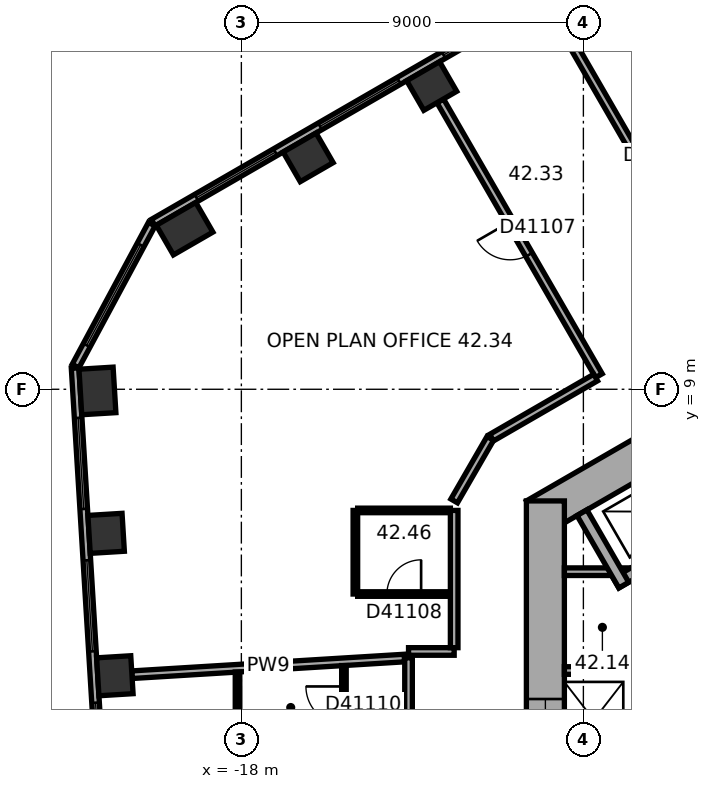
"""IFC4 building model, lengths in metres.
Left out: names, types, materials, properties, quantities, classifications, styles, units other than length and angle.
Written with IfcOpenShell. Run it as: python <this file> out.ifc"""

import sys

from ifc_helpers import new_model, si_unit, direction, frame, frame_2d, origin, origin_2d, place, context, subcontext, project, spatial, rectangle, extrude, element, fill, save


model = new_model("IFC4")
c1 = context("Model", 3, precision=1e-05, world=origin(), true_north=direction((0.0, 1.0)))
c2 = subcontext(c1, "Body", "Model", "MODEL_VIEW")
j1 = project(units=[si_unit("LENGTHUNIT", "METRE"), si_unit("PLANEANGLEUNIT", "RADIAN")], contexts=[c1])
p1 = place(None, origin())
s1 = spatial("IfcSite", under=j1, at=p1, CompositionType="ELEMENT")
p2 = place(p1, origin())
s2 = spatial("IfcBuilding", under=s1, at=p2, CompositionType="ELEMENT")
p3 = place(p2, frame((0.0, 0.0, 172.5)))
s3 = spatial("IfcBuildingStorey", under=s2, at=p3, CompositionType="ELEMENT", Elevation=172.5)
for number, where, z_axis, x_axis in (
    (1, (-12.991, 16.979, 0.0), (0.0, 0.0, 1.0), (-0.866, -0.5, 0.0)),
    (2, (-16.242, 15.102, 0.0), (0.0, 0.0, 1.0), (-0.866, -0.5, 0.0)),
):
    element("IfcColumn", number, at=place(p3, frame(where, z_axis=z_axis, x_axis=x_axis)), inside=s3, PredefinedType="COLUMN", context=c2, shape_type="SweptSolid", body=[
        extrude(rectangle(XDim=1.0, YDim=0.9, at=origin_2d()), origin(), (0.0, 0.0, 1.0), 3.7),
    ])
for number, where, z_axis, x_axis in (
    (3, (-19.494, 13.225, 0.0), (0.0, 0.0, 1.0), (-0.866, -0.5, 0.0)),
    (4, (-21.787, 8.956, 0.0), (0.0, 0.0, 1.0), (0.061, -0.998, 0.0)),
):
    element("IfcColumn", number, at=place(p3, frame(where, z_axis=z_axis, x_axis=x_axis)), inside=s3, PredefinedType="COLUMN", context=c2, shape_type="SweptSolid", body=[
        extrude(rectangle(XDim=1.2, YDim=0.9, at=origin_2d()), origin(), (0.0, 0.0, 1.0), 3.7),
    ])
for number, where, z_axis, x_axis in (
    (5, (-21.558, 5.209, 0.0), (0.0, 0.0, 1.0), (0.061, -0.998, 0.0)),
    (6, (-21.329, 1.462, 0.0), (0.0, 0.0, 1.0), (0.061, -0.998, 0.0)),
):
    element("IfcColumn", number, at=place(p3, frame(where, z_axis=z_axis, x_axis=x_axis)), inside=s3, PredefinedType="COLUMN", context=c2, shape_type="SweptSolid", body=[
        extrude(rectangle(XDim=1.0, YDim=0.9, at=origin_2d()), origin(), (0.0, 0.0, 1.0), 3.7),
    ])
p4 = place(p3, frame((0.25, 11.691, 0.0), z_axis=(0.0, 0.0, 1.0), x_axis=(-0.866022616891, -0.50000482701, 0.0)))
e7 = element("IfcWall", 7, at=p4, inside=s3, PredefinedType="SHEAR", context=c2, shape_type="SweptSolid", body=[
    extrude(rectangle(XDim=12.125, YDim=1.0, at=frame_2d((6.062, 0.0))), origin(), (0.0, 0.0, 1.0), 3.7),
])
p5 = place(p4, frame((6.262, 0.0, 0.0)))
e8 = element("IfcOpeningElement", 8, at=p5, cuts=e7, PredefinedType="OPENING", context=c2, shape_type="SweptSolid", body=[
    extrude(rectangle(XDim=1.5, YDim=2.1, at=frame_2d((0.75, 1.05))), frame((0.0, 0.51, 0.0), z_axis=(0.0, -1.0, 0.0), x_axis=(1.0, 0.0, 0.0)), (0.0, 0.0, 1.0), 1.02),
])
p6 = place(p4, frame((3.112, 0.0, 0.0)))
e9 = element("IfcOpeningElement", 9, at=p6, cuts=e7, PredefinedType="OPENING", context=c2, shape_type="SweptSolid", body=[
    extrude(rectangle(XDim=0.9, YDim=2.1, at=frame_2d((0.45, 1.05))), frame((0.0, 0.51, 0.0), z_axis=(0.0, -1.0, 0.0), x_axis=(1.0, 0.0, 0.0)), (0.0, 0.0, 1.0), 1.02),
])
p7 = place(p3, frame((-10.0, 6.062, 0.0), z_axis=(0.0, 0.0, 1.0), x_axis=(0.0, -1.0, 0.0)))
e10 = element("IfcWall", 10, at=p7, inside=s3, PredefinedType="SHEAR", context=c2, shape_type="SweptSolid", body=[
    extrude(rectangle(XDim=12.125, YDim=1.0, at=frame_2d((6.062, 0.0))), origin(), (0.0, 0.0, 1.0), 3.7),
])
p8 = place(p7, frame((5.212, 0.0, 0.0)))
e11 = element("IfcOpeningElement", 11, at=p8, cuts=e10, PredefinedType="OPENING", context=c2, shape_type="SweptSolid", body=[
    extrude(rectangle(XDim=1.1, YDim=2.1, at=frame_2d((0.55, 1.05))), frame((0.0, 0.51, 0.0), z_axis=(0.0, -1.0, 0.0), x_axis=(1.0, 0.0, 0.0)), (0.0, 0.0, 1.0), 1.02),
])
p9 = place(p7, frame((7.812, 0.0, 0.0)))
e12 = element("IfcOpeningElement", 12, at=p9, cuts=e10, PredefinedType="OPENING", context=c2, shape_type="SweptSolid", body=[
    extrude(rectangle(XDim=1.1, YDim=2.1, at=frame_2d((0.55, 1.05))), frame((0.0, 0.51, 0.0), z_axis=(0.0, -1.0, 0.0), x_axis=(1.0, 0.0, 0.0)), (0.0, 0.0, 1.0), 1.02),
])
p10 = place(p3, frame((-2.961, 23.405, 0.0), z_axis=(0.0, 0.0, 1.0), x_axis=(-0.866023315909, -0.500003616288, 0.0)))
e13 = element("IfcWall", 13, at=p10, inside=s3, PredefinedType="STANDARD", context=c2, shape_type="SweptSolid", body=[
    extrude(rectangle(XDim=20.044, YDim=0.2, at=frame_2d((10.022, 0.0))), origin(), (0.0, 0.0, 1.0), 3.7),
])
p11 = place(p10, frame((1.314, 0.0, 0.9)))
e14 = element("IfcOpeningElement", 14, at=p11, cuts=e13, PredefinedType="OPENING", context=c2, shape_type="SweptSolid", body=[
    extrude(rectangle(XDim=2.4, YDim=2.0, at=frame_2d((1.2, 1.0))), frame((0.0, 0.11, 0.0), z_axis=(0.0, -1.0, 0.0), x_axis=(1.0, 0.0, 0.0)), (0.0, 0.0, 1.0), 0.22),
])
p12 = place(p10, frame((5.069, 0.0, 0.9)))
e15 = element("IfcOpeningElement", 15, at=p12, cuts=e13, PredefinedType="OPENING", context=c2, shape_type="SweptSolid", body=[
    extrude(rectangle(XDim=2.4, YDim=2.0, at=frame_2d((1.2, 1.0))), frame((0.0, 0.11, 0.0), z_axis=(0.0, -1.0, 0.0), x_axis=(1.0, 0.0, 0.0)), (0.0, 0.0, 1.0), 0.22),
])
p13 = place(p10, frame((8.823, 0.0, 0.9)))
e16 = element("IfcOpeningElement", 16, at=p13, cuts=e13, PredefinedType="OPENING", context=c2, shape_type="SweptSolid", body=[
    extrude(rectangle(XDim=2.4, YDim=2.0, at=frame_2d((1.2, 1.0))), frame((0.0, 0.11, 0.0), z_axis=(0.0, -1.0, 0.0), x_axis=(1.0, 0.0, 0.0)), (0.0, 0.0, 1.0), 0.22),
])
p14 = place(p10, frame((12.577, 0.0, 0.9)))
e17 = element("IfcOpeningElement", 17, at=p14, cuts=e13, PredefinedType="OPENING", context=c2, shape_type="SweptSolid", body=[
    extrude(rectangle(XDim=2.4, YDim=2.0, at=frame_2d((1.2, 1.0))), frame((0.0, 0.11, 0.0), z_axis=(0.0, -1.0, 0.0), x_axis=(1.0, 0.0, 0.0)), (0.0, 0.0, 1.0), 0.22),
])
p15 = place(p10, frame((16.331, 0.0, 0.9)))
e18 = element("IfcOpeningElement", 18, at=p15, cuts=e13, PredefinedType="OPENING", context=c2, shape_type="SweptSolid", body=[
    extrude(rectangle(XDim=2.4, YDim=2.0, at=frame_2d((1.2, 1.0))), frame((0.0, 0.11, 0.0), z_axis=(0.0, -1.0, 0.0), x_axis=(1.0, 0.0, 0.0)), (0.0, 0.0, 1.0), 0.22),
])
p16 = place(p3, frame((-20.357, 13.344, 0.0), z_axis=(0.0, 0.0, 1.0), x_axis=(-0.473288913494, -0.880907262068, 0.0)))
e19 = element("IfcWall", 19, at=p16, inside=s3, PredefinedType="STANDARD", context=c2, shape_type="SweptSolid", body=[
    extrude(rectangle(XDim=4.238, YDim=0.2, at=frame_2d((2.119, 0.0))), origin(), (0.0, 0.0, 1.0), 3.7),
])
p17 = place(p16, frame((0.619, 0.0, 0.9)))
e20 = element("IfcOpeningElement", 20, at=p17, cuts=e19, PredefinedType="OPENING", context=c2, shape_type="SweptSolid", body=[
    extrude(rectangle(XDim=3.0, YDim=2.0, at=frame_2d((1.5, 1.0))), frame((0.0, 0.11, 0.0), z_axis=(0.0, -1.0, 0.0), x_axis=(1.0, 0.0, 0.0)), (0.0, 0.0, 1.0), 0.22),
])
p18 = place(p3, frame((-22.375, 9.557, 0.0), z_axis=(0.0, 0.0, 1.0), x_axis=(0.061036015339, -0.998135564356, 0.0)))
e21 = element("IfcWall", 21, at=p18, inside=s3, PredefinedType="STANDARD", context=c2, shape_type="SweptSolid", body=[
    extrude(rectangle(XDim=20.044, YDim=0.2, at=frame_2d((10.022, 0.0))), origin(), (0.0, 0.0, 1.0), 3.7),
])
p19 = place(p18, frame((1.313, 0.0, 0.9)))
e22 = element("IfcOpeningElement", 22, at=p19, cuts=e21, PredefinedType="OPENING", context=c2, shape_type="SweptSolid", body=[
    extrude(rectangle(XDim=2.4, YDim=2.0, at=frame_2d((1.2, 1.0))), frame((0.0, 0.11, 0.0), z_axis=(0.0, -1.0, 0.0), x_axis=(1.0, 0.0, 0.0)), (0.0, 0.0, 1.0), 0.22),
])
p20 = place(p18, frame((5.067, 0.0, 0.9)))
e23 = element("IfcOpeningElement", 23, at=p20, cuts=e21, PredefinedType="OPENING", context=c2, shape_type="SweptSolid", body=[
    extrude(rectangle(XDim=2.4, YDim=2.0, at=frame_2d((1.2, 1.0))), frame((0.0, 0.11, 0.0), z_axis=(0.0, -1.0, 0.0), x_axis=(1.0, 0.0, 0.0)), (0.0, 0.0, 1.0), 0.22),
])
p21 = place(p18, frame((8.821, 0.0, 0.9)))
e24 = element("IfcOpeningElement", 24, at=p21, cuts=e21, PredefinedType="OPENING", context=c2, shape_type="SweptSolid", body=[
    extrude(rectangle(XDim=2.4, YDim=2.0, at=frame_2d((1.2, 1.0))), frame((0.0, 0.11, 0.0), z_axis=(0.0, -1.0, 0.0), x_axis=(1.0, 0.0, 0.0)), (0.0, 0.0, 1.0), 0.22),
])
p22 = place(p18, frame((12.575, 0.0, 0.9)))
e25 = element("IfcOpeningElement", 25, at=p22, cuts=e21, PredefinedType="OPENING", context=c2, shape_type="SweptSolid", body=[
    extrude(rectangle(XDim=2.4, YDim=2.0, at=frame_2d((1.2, 1.0))), frame((0.0, 0.11, 0.0), z_axis=(0.0, -1.0, 0.0), x_axis=(1.0, 0.0, 0.0)), (0.0, 0.0, 1.0), 0.22),
])
p23 = place(p18, frame((16.329, 0.0, 0.9)))
e26 = element("IfcOpeningElement", 26, at=p23, cuts=e21, PredefinedType="OPENING", context=c2, shape_type="SweptSolid", body=[
    extrude(rectangle(XDim=2.4, YDim=2.0, at=frame_2d((1.2, 1.0))), frame((0.0, 0.11, 0.0), z_axis=(0.0, -1.0, 0.0), x_axis=(1.0, 0.0, 0.0)), (0.0, 0.0, 1.0), 0.22),
])
for number, where, z_axis, x_axis in (
    (27, (-7.3, 4.2, 0.0), (0.0, 0.0, 1.0), (-1.0, 0.0, 0.0)),
    (28, (-7.3, 1.6, 0.0), (0.0, 0.0, 1.0), (-1.0, 0.0, 0.0)),
):
    element("IfcWall", number, at=place(p3, frame(where, z_axis=z_axis, x_axis=x_axis)), inside=s3, PredefinedType="PARTITIONING", context=c2, shape_type="SweptSolid", body=[
        extrude(rectangle(XDim=2.2, YDim=0.2, at=frame_2d((1.1, 0.0))), origin(), (0.0, 0.0, 1.0), 3.42),
    ])
p24 = place(p3, frame((-5.24, 5.577, 0.0), z_axis=(0.0, 0.0, 1.0), x_axis=(-0.866014461049, -0.500018952895, 0.0)))
e29 = element("IfcWall", 29, at=p24, inside=s3, PredefinedType="SHEAR", context=c2, shape_type="SweptSolid", body=[
    extrude(rectangle(XDim=3.35, YDim=0.3, at=frame_2d((1.675, 0.0))), origin(), (0.0, 0.0, 1.0), 3.42),
])
p25 = place(p3, frame((-7.937, 3.847, 0.0), z_axis=(0.0, 0.0, 1.0), x_axis=(-0.50002983664, 0.866008176907, 0.0)))
e30 = element("IfcWall", 30, at=p25, inside=s3, PredefinedType="SHEAR", context=c2, shape_type="SweptSolid", body=[
    extrude(rectangle(XDim=2.2, YDim=0.3, at=frame_2d((1.1, 0.0))), origin(), (0.0, 0.0, 1.0), 3.42),
])
p26 = place(p3, frame((-20.88, 1.49, 0.0), z_axis=(0.0, 0.0, 1.0), x_axis=(0.998134881975, 0.061047173439, 0.0)))
e31 = element("IfcWall", 31, at=p26, inside=s3, PredefinedType="PARTITIONING", context=c2, shape_type="SweptSolid", body=[
    extrude(rectangle(XDim=7.183, YDim=0.2, at=frame_2d((3.591, 0.0))), origin(), (0.0, 0.0, 1.0), 2.87),
])
p27 = place(p3, frame((-18.101, 1.559, 0.0), z_axis=(0.0, 0.0, 1.0), x_axis=(0.0, -1.0, 0.0)))
e32 = element("IfcWall", 32, at=p27, inside=s3, PredefinedType="PARTITIONING", context=c2, shape_type="SweptSolid", body=[
    extrude(rectangle(XDim=1.869, YDim=0.12, at=frame_2d((0.934, 0.0))), origin(), (0.0, 0.0, 1.0), 3.42),
])
p28 = place(p3, frame((-15.301, 1.731, 0.0), z_axis=(0.0, 0.0, 1.0), x_axis=(0.0, -1.0, 0.0)))
e33 = element("IfcWall", 33, at=p28, inside=s3, PredefinedType="PARTITIONING", context=c2, shape_type="SweptSolid", body=[
    extrude(rectangle(XDim=7.322, YDim=0.12, at=frame_2d((3.661, 0.0))), origin(), (0.0, 0.0, 1.0), 3.42),
])
p29 = place(p28, frame((0.55, 0.0, 0.0)))
e34 = element("IfcOpeningElement", 34, at=p29, cuts=e33, PredefinedType="OPENING", context=c2, shape_type="SweptSolid", body=[
    extrude(rectangle(XDim=1.0, YDim=2.1, at=frame_2d((0.5, 1.05))), frame((0.0, 0.07, 0.0), z_axis=(0.0, -1.0, 0.0), x_axis=(1.0, 0.0, 0.0)), (0.0, 0.0, 1.0), 0.14),
])
p30 = place(p28, frame((2.736, 0.0, 0.0)))
e35 = element("IfcOpeningElement", 35, at=p30, cuts=e33, PredefinedType="OPENING", context=c2, shape_type="SweptSolid", body=[
    extrude(rectangle(XDim=0.9, YDim=2.1, at=frame_2d((0.45, 1.05))), frame((0.0, 0.07, 0.0), z_axis=(0.0, -1.0, 0.0), x_axis=(1.0, 0.0, 0.0)), (0.0, 0.0, 1.0), 0.14),
])
p31 = place(p28, frame((5.347, 0.0, 0.0)))
e36 = element("IfcOpeningElement", 36, at=p31, cuts=e33, PredefinedType="OPENING", context=c2, shape_type="SweptSolid", body=[
    extrude(rectangle(XDim=0.9, YDim=2.1, at=frame_2d((0.45, 1.05))), frame((0.0, 0.07, 0.0), z_axis=(0.0, -1.0, 0.0), x_axis=(1.0, 0.0, 0.0)), (0.0, 0.0, 1.0), 0.14),
])
p32 = place(p3, frame((-15.0, 3.612, 0.0), z_axis=(0.0, 0.0, 1.0), x_axis=(0.0, 1.0, 0.0)))
e37 = element("IfcWall", 37, at=p32, inside=s3, PredefinedType="PARTITIONING", context=c2, shape_type="SweptSolid", body=[
    extrude(rectangle(XDim=2.2, YDim=0.12, at=frame_2d((1.1, 0.0))), origin(), (0.0, 0.0, 1.0), 3.42),
])
p33 = place(p3, frame((-14.94, 5.812, 0.0), z_axis=(0.0, 0.0, 1.0), x_axis=(1.0, 0.0, 0.0)))
e38 = element("IfcWall", 38, at=p33, inside=s3, PredefinedType="PARTITIONING", context=c2, shape_type="SweptSolid", body=[
    extrude(rectangle(XDim=2.44, YDim=0.12, at=frame_2d((1.22, 0.0))), origin(), (0.0, 0.0, 1.0), 3.42),
])
p34 = place(p3, frame((-13.601, 1.935, 0.0), z_axis=(0.0, 0.0, 1.0), x_axis=(0.0, -1.0, 0.0)))
e39 = element("IfcWall", 39, at=p34, inside=s3, PredefinedType="PARTITIONING", context=c2, shape_type="SweptSolid", body=[
    extrude(rectangle(XDim=5.936, YDim=0.2, at=frame_2d((2.968, 0.0))), origin(), (0.0, 0.0, 1.0), 3.42),
])
p35 = place(p34, frame((2.468, 0.0, 0.0)))
e40 = element("IfcOpeningElement", 40, at=p35, cuts=e39, PredefinedType="OPENING", context=c2, shape_type="SweptSolid", body=[
    extrude(rectangle(XDim=1.0, YDim=2.1, at=frame_2d((0.5, 1.05))), frame((0.0, 0.11, 0.0), z_axis=(0.0, -1.0, 0.0), x_axis=(1.0, 0.0, 0.0)), (0.0, 0.0, 1.0), 0.22),
])
p36 = place(p3, frame((-12.766, 16.589, 0.0), z_axis=(0.0, 0.0, 1.0), x_axis=(0.500010139422, -0.866019549707, 0.0)))
e41 = element("IfcWall", 41, at=p36, inside=s3, PredefinedType="PARTITIONING", context=c2, shape_type="SweptSolid", body=[
    extrude(rectangle(XDim=8.35, YDim=0.2, at=frame_2d((4.175, 0.0))), origin(), (0.0, 0.0, 1.0), 3.42),
])
p37 = place(p36, frame((3.675, 0.0, 0.0)))
e42 = element("IfcOpeningElement", 42, at=p37, cuts=e41, PredefinedType="OPENING", context=c2, shape_type="SweptSolid", body=[
    extrude(rectangle(XDim=1.0, YDim=2.1, at=frame_2d((0.5, 1.05))), frame((0.0, 0.11, 0.0), z_axis=(0.0, -1.0, 0.0), x_axis=(1.0, 0.0, 0.0)), (0.0, 0.0, 1.0), 0.22),
])
p38 = place(p3, frame((-12.5, 3.612, 0.0), z_axis=(0.0, 0.0, 1.0), x_axis=(-1.0, 0.0, 0.0)))
e43 = element("IfcWall", 43, at=p38, inside=s3, PredefinedType="PARTITIONING", context=c2, shape_type="SweptSolid", body=[
    extrude(rectangle(XDim=2.44, YDim=0.12, at=frame_2d((1.22, 0.0))), origin(), (0.0, 0.0, 1.0), 3.42),
])
p39 = place(p38, frame((0.77, 0.0, 0.0)))
e44 = element("IfcOpeningElement", 44, at=p39, cuts=e43, PredefinedType="OPENING", context=c2, shape_type="SweptSolid", body=[
    extrude(rectangle(XDim=0.9, YDim=2.1, at=frame_2d((0.45, 1.05))), frame((0.0, 0.07, 0.0), z_axis=(0.0, -1.0, 0.0), x_axis=(1.0, 0.0, 0.0)), (0.0, 0.0, 1.0), 0.14),
])
p40 = place(p3, frame((-12.4, 2.101, 0.0), z_axis=(0.0, 0.0, 1.0), x_axis=(-1.0, 0.0, 0.0)))
e45 = element("IfcWall", 45, at=p40, inside=s3, PredefinedType="PARTITIONING", context=c2, shape_type="SweptSolid", body=[
    extrude(rectangle(XDim=1.201, YDim=0.2, at=frame_2d((0.601, 0.0))), origin(), (0.0, 0.0, 1.0), 3.42),
])
p41 = place(p3, frame((-12.4, 5.812, 0.0), z_axis=(0.0, 0.0, 1.0), x_axis=(0.0, -1.0, 0.0)))
e46 = element("IfcWall", 46, at=p41, inside=s3, PredefinedType="PARTITIONING", context=c2, shape_type="SweptSolid", body=[
    extrude(rectangle(XDim=3.611, YDim=0.2, at=frame_2d((1.806, 0.0))), origin(), (0.0, 0.0, 1.0), 3.42),
])
p42 = place(p3, frame((-11.45, 7.708, 0.0), z_axis=(0.0, 0.0, 1.0), x_axis=(-0.500022797313, -0.86601224135, 0.0)))
e47 = element("IfcWall", 47, at=p42, inside=s3, PredefinedType="PARTITIONING", context=c2, shape_type="SweptSolid", body=[
    extrude(rectangle(XDim=1.9, YDim=0.2, at=frame_2d((0.95, 0.0))), origin(), (0.0, 0.0, 1.0), 3.42),
])
p43 = place(p3, frame((-9.515, 18.466, 0.0), z_axis=(0.0, 0.0, 1.0), x_axis=(0.500010139422, -0.866019549707, 0.0)))
e48 = element("IfcWall", 48, at=p43, inside=s3, PredefinedType="PARTITIONING", context=c2, shape_type="SweptSolid", body=[
    extrude(rectangle(XDim=8.35, YDim=0.2, at=frame_2d((4.175, 0.0))), origin(), (0.0, 0.0, 1.0), 2.87),
])
p44 = place(p43, frame((3.675, 0.0, 0.0)))
e49 = element("IfcOpeningElement", 49, at=p44, cuts=e48, PredefinedType="OPENING", context=c2, shape_type="SweptSolid", body=[
    extrude(rectangle(XDim=1.0, YDim=2.1, at=frame_2d((0.5, 1.05))), frame((0.0, 0.11, 0.0), z_axis=(0.0, -1.0, 0.0), x_axis=(1.0, 0.0, 0.0)), (0.0, 0.0, 1.0), 0.22),
])
p45 = place(p3, frame((-8.678, 9.308, 0.0), z_axis=(0.0, 0.0, 1.0), x_axis=(-0.866000359435, -0.500043375578, 0.0)))
e50 = element("IfcWall", 50, at=p45, inside=s3, PredefinedType="PARTITIONING", context=c2, shape_type="SweptSolid", body=[
    extrude(rectangle(XDim=3.161, YDim=0.2, at=frame_2d((1.581, 0.0))), origin(), (0.0, 0.0, 1.0), 3.42),
])
p46 = place(p13, origin())
e51 = element("IfcWindow", 51, at=p46, inside=s3, PartitioningType="SINGLE_PANEL", PredefinedType="WINDOW", context=c2, shape_type="SweptSolid", body=[
    extrude(rectangle(XDim=2.4, YDim=2.0, at=frame_2d((1.2, 1.0))), frame((0.0, 0.03, 0.0), z_axis=(0.0, -1.0, 0.0), x_axis=(1.0, 0.0, 0.0)), (0.0, 0.0, 1.0), 0.06),
])
fill(e16, e51)
p47 = place(p14, origin())
e52 = element("IfcWindow", 52, at=p47, inside=s3, PartitioningType="SINGLE_PANEL", PredefinedType="WINDOW", context=c2, shape_type="SweptSolid", body=[
    extrude(rectangle(XDim=2.4, YDim=2.0, at=frame_2d((1.2, 1.0))), frame((0.0, 0.03, 0.0), z_axis=(0.0, -1.0, 0.0), x_axis=(1.0, 0.0, 0.0)), (0.0, 0.0, 1.0), 0.06),
])
fill(e17, e52)
p48 = place(p15, origin())
e53 = element("IfcWindow", 53, at=p48, inside=s3, PartitioningType="SINGLE_PANEL", PredefinedType="WINDOW", context=c2, shape_type="SweptSolid", body=[
    extrude(rectangle(XDim=2.4, YDim=2.0, at=frame_2d((1.2, 1.0))), frame((0.0, 0.03, 0.0), z_axis=(0.0, -1.0, 0.0), x_axis=(1.0, 0.0, 0.0)), (0.0, 0.0, 1.0), 0.06),
])
fill(e18, e53)
p49 = place(p17, origin())
e54 = element("IfcWindow", 54, at=p49, inside=s3, PartitioningType="SINGLE_PANEL", PredefinedType="WINDOW", context=c2, shape_type="SweptSolid", body=[
    extrude(rectangle(XDim=3.0, YDim=2.0, at=frame_2d((1.5, 1.0))), frame((0.0, 0.03, 0.0), z_axis=(0.0, -1.0, 0.0), x_axis=(1.0, 0.0, 0.0)), (0.0, 0.0, 1.0), 0.06),
])
fill(e20, e54)
p50 = place(p19, origin())
e55 = element("IfcWindow", 55, at=p50, inside=s3, PartitioningType="SINGLE_PANEL", PredefinedType="WINDOW", context=c2, shape_type="SweptSolid", body=[
    extrude(rectangle(XDim=2.4, YDim=2.0, at=frame_2d((1.2, 1.0))), frame((0.0, 0.03, 0.0), z_axis=(0.0, -1.0, 0.0), x_axis=(1.0, 0.0, 0.0)), (0.0, 0.0, 1.0), 0.06),
])
fill(e22, e55)
p51 = place(p20, origin())
e56 = element("IfcWindow", 56, at=p51, inside=s3, PartitioningType="SINGLE_PANEL", PredefinedType="WINDOW", context=c2, shape_type="SweptSolid", body=[
    extrude(rectangle(XDim=2.4, YDim=2.0, at=frame_2d((1.2, 1.0))), frame((0.0, 0.03, 0.0), z_axis=(0.0, -1.0, 0.0), x_axis=(1.0, 0.0, 0.0)), (0.0, 0.0, 1.0), 0.06),
])
fill(e23, e56)
p52 = place(p21, origin())
e57 = element("IfcWindow", 57, at=p52, inside=s3, PartitioningType="SINGLE_PANEL", PredefinedType="WINDOW", context=c2, shape_type="SweptSolid", body=[
    extrude(rectangle(XDim=2.4, YDim=2.0, at=frame_2d((1.2, 1.0))), frame((0.0, 0.03, 0.0), z_axis=(0.0, -1.0, 0.0), x_axis=(1.0, 0.0, 0.0)), (0.0, 0.0, 1.0), 0.06),
])
fill(e24, e57)
p53 = place(p8, origin())
e58 = element("IfcDoor", 58, at=p53, inside=s3, OperationType="DOUBLE_DOOR_SLIDING", PredefinedType="DOOR", context=c2, shape_type="SweptSolid", body=[
    extrude(rectangle(XDim=1.1, YDim=2.1, at=frame_2d((0.55, 1.05))), frame((0.0, 0.025, 0.0), z_axis=(0.0, -1.0, 0.0), x_axis=(1.0, 0.0, 0.0)), (0.0, 0.0, 1.0), 0.05),
])
fill(e11, e58)
p54 = place(p37, origin())
e59 = element("IfcDoor", 59, at=p54, inside=s3, OperationType="SINGLE_SWING_LEFT", PredefinedType="DOOR", context=c2, shape_type="SweptSolid", body=[
    extrude(rectangle(XDim=1.0, YDim=2.1, at=frame_2d((0.5, 1.05))), frame((0.0, 0.025, 0.0), z_axis=(0.0, -1.0, 0.0), x_axis=(1.0, 0.0, 0.0)), (0.0, 0.0, 1.0), 0.05),
])
fill(e42, e59)
p55 = place(p39, origin())
e60 = element("IfcDoor", 60, at=p55, inside=s3, OperationType="SINGLE_SWING_LEFT", PredefinedType="DOOR", context=c2, shape_type="SweptSolid", body=[
    extrude(rectangle(XDim=0.9, YDim=2.1, at=frame_2d((0.45, 1.05))), frame((0.0, 0.025, 0.0), z_axis=(0.0, -1.0, 0.0), x_axis=(1.0, 0.0, 0.0)), (0.0, 0.0, 1.0), 0.05),
])
fill(e44, e60)
p56 = place(p29, origin())
e61 = element("IfcDoor", 61, at=p56, inside=s3, OperationType="SINGLE_SWING_LEFT", PredefinedType="DOOR", context=c2, shape_type="SweptSolid", body=[
    extrude(rectangle(XDim=1.0, YDim=2.1, at=frame_2d((0.5, 1.05))), frame((0.0, 0.025, 0.0), z_axis=(0.0, -1.0, 0.0), x_axis=(1.0, 0.0, 0.0)), (0.0, 0.0, 1.0), 0.05),
])
fill(e34, e61)
save(model, sys.argv[1])
